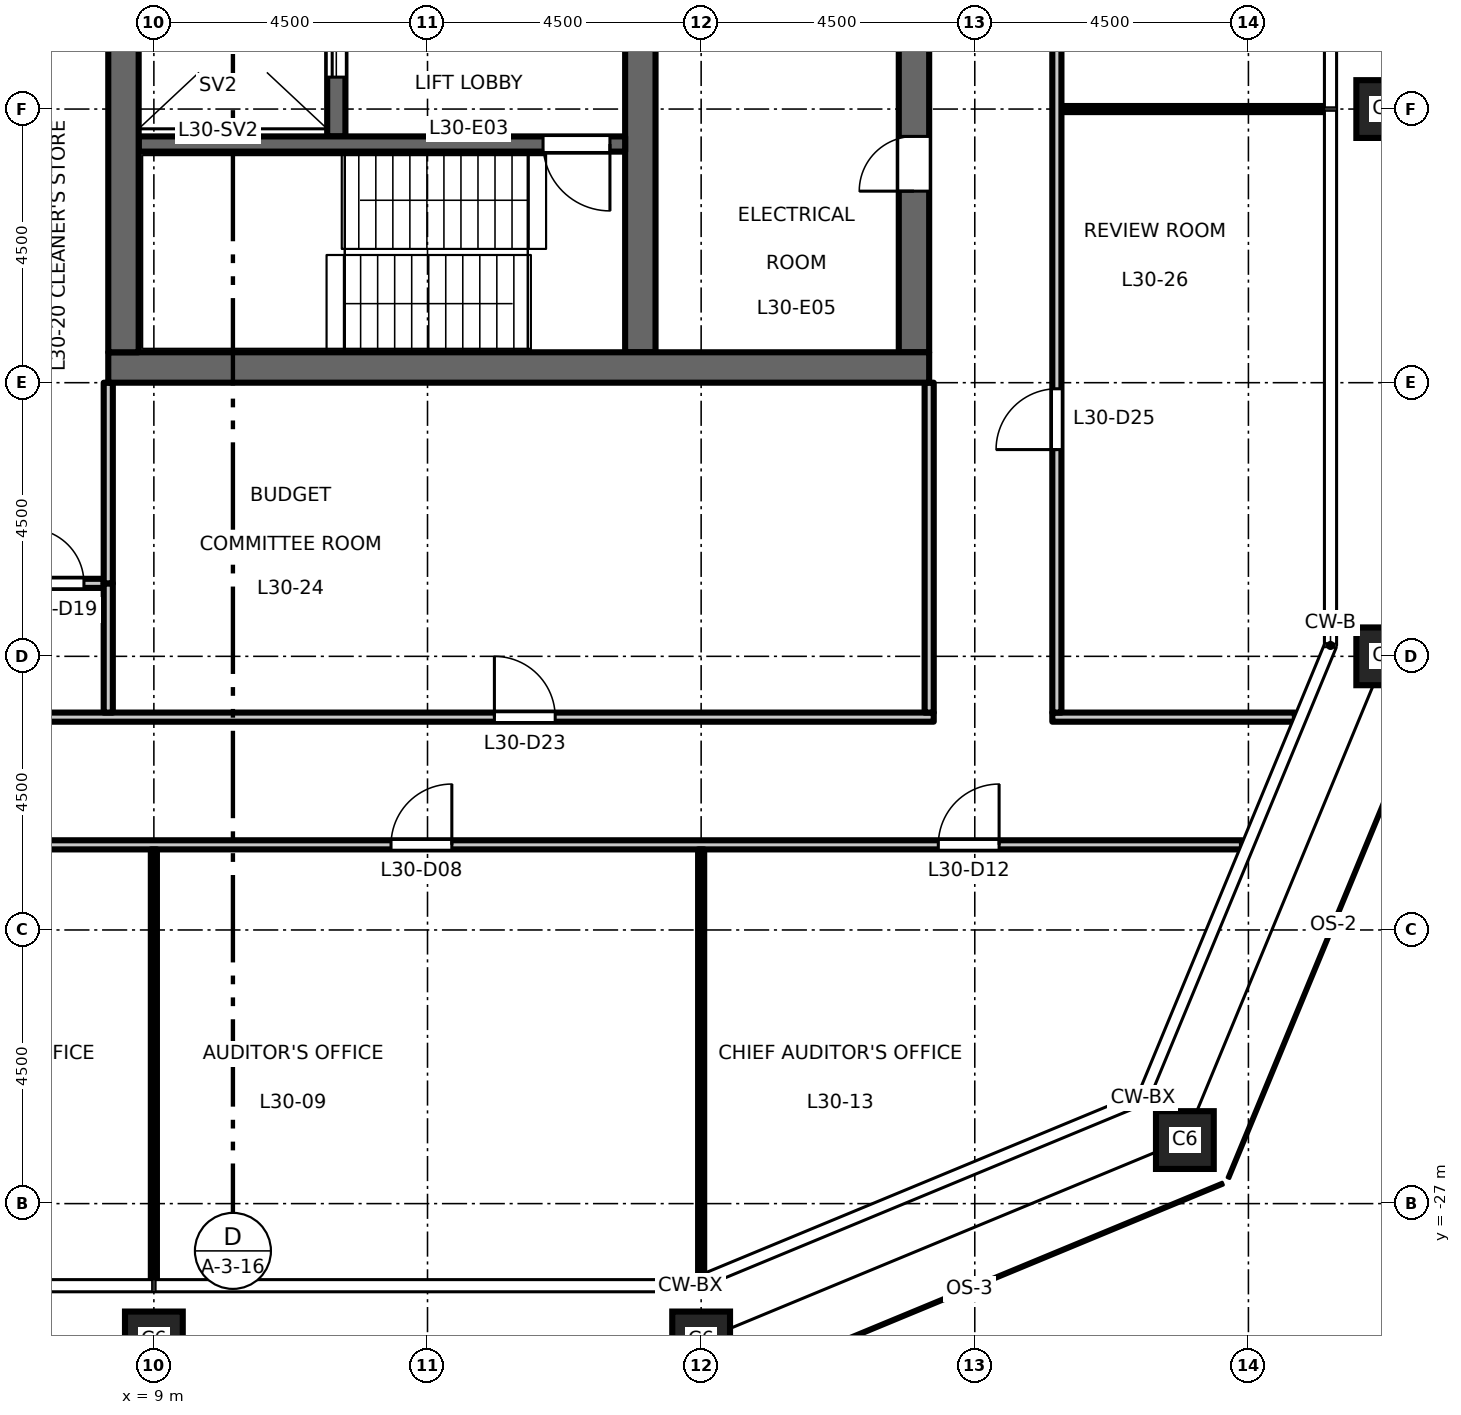
"""IFC4 building model, lengths in metres.
Left out: names, types, materials, properties, quantities, classifications, styles, units other than length and angle.
Written with IfcOpenShell. Run it as: python <this file> out.ifc"""

import sys

from ifc_helpers import new_model, si_unit, direction, frame, frame_2d, origin, origin_2d, place, context, subcontext, project, spatial, rectangle, hollow_rectangle, extrude, element, fill, save


model = new_model("IFC4")
c1 = context("Model", 3, precision=1e-05, world=origin(), true_north=direction((0.0, 1.0)))
c2 = subcontext(c1, "Body", "Model", "MODEL_VIEW")
j1 = project(units=[si_unit("LENGTHUNIT", "METRE"), si_unit("PLANEANGLEUNIT", "RADIAN")], contexts=[c1])
p1 = place(None, origin())
s1 = spatial("IfcSite", under=j1, at=p1, CompositionType="ELEMENT")
p2 = place(p1, origin())
s2 = spatial("IfcBuilding", under=s1, at=p2, CompositionType="ELEMENT")
p3 = place(p2, frame((0.0, 0.0, 140.7)))
s3 = spatial("IfcBuildingStorey", under=s2, at=p3, CompositionType="ELEMENT", Elevation=140.7)
for number, where, z_axis, x_axis in (
    (1, (9.0, -29.25, 0.0), (0.0, 0.0, 1.0), (1.0, 0.0, 0.0)),
    (2, (18.0, -29.25, 0.0), (0.0, 0.0, 1.0), (1.0, 0.0, 0.0)),
    (3, (25.955, -25.955, 0.0), (0.0, 0.0, 1.0), (1.0, 0.0, 0.0)),
    (4, (29.25, -18.0, 0.0), (0.0, 0.0, 1.0), (1.0, 0.0, 0.0)),
    (5, (29.25, -9.0, 0.0), (0.0, 0.0, 1.0), (1.0, 0.0, 0.0)),
):
    element("IfcColumn", number, at=place(p3, frame(where, z_axis=z_axis, x_axis=x_axis)), inside=s3, PredefinedType="COLUMN", context=c2, shape_type="SweptSolid", body=[
        extrude(hollow_rectangle(XDim=0.95, YDim=0.95, WallThickness=0.055, at=origin_2d()), origin(), (0.0, 0.0, 1.0), 4.5),
    ])
p4 = place(p3, frame((12.0, -9.45, 0.0), z_axis=(0.0, 0.0, 1.0), x_axis=(0.0, 1.0, 0.0)))
e6 = element("IfcWall", 6, at=p4, inside=s3, PredefinedType="SHEAR", context=c2, shape_type="SweptSolid", body=[
    extrude(rectangle(XDim=18.9, YDim=0.3, at=frame_2d((9.45, 0.0))), origin(), (0.0, 0.0, 1.0), 4.35),
])
p5 = place(p4, frame((3.625, 0.0, 0.0)))
e7 = element("IfcOpeningElement", 7, at=p5, cuts=e6, PredefinedType="OPENING", context=c2, shape_type="SweptSolid", body=[
    extrude(rectangle(XDim=1.1, YDim=2.1, at=frame_2d((0.55, 1.05))), frame((0.0, 0.16, 0.0), z_axis=(0.0, -1.0, 0.0), x_axis=(1.0, 0.0, 0.0)), (0.0, 0.0, 1.0), 0.32),
])
p6 = place(p4, frame((6.775, 0.0, 0.0)))
e8 = element("IfcOpeningElement", 8, at=p6, cuts=e6, PredefinedType="OPENING", context=c2, shape_type="SweptSolid", body=[
    extrude(rectangle(XDim=1.1, YDim=2.1, at=frame_2d((0.55, 1.05))), frame((0.0, 0.16, 0.0), z_axis=(0.0, -1.0, 0.0), x_axis=(1.0, 0.0, 0.0)), (0.0, 0.0, 1.0), 0.32),
])
p7 = place(p4, frame((9.925, 0.0, 0.0)))
e9 = element("IfcOpeningElement", 9, at=p7, cuts=e6, PredefinedType="OPENING", context=c2, shape_type="SweptSolid", body=[
    extrude(rectangle(XDim=1.1, YDim=2.1, at=frame_2d((0.55, 1.05))), frame((0.0, 0.16, 0.0), z_axis=(0.0, -1.0, 0.0), x_axis=(1.0, 0.0, 0.0)), (0.0, 0.0, 1.0), 0.32),
])
p8 = place(p4, frame((13.075, 0.0, 0.0)))
e10 = element("IfcOpeningElement", 10, at=p8, cuts=e6, PredefinedType="OPENING", context=c2, shape_type="SweptSolid", body=[
    extrude(rectangle(XDim=1.1, YDim=2.1, at=frame_2d((0.55, 1.05))), frame((0.0, 0.16, 0.0), z_axis=(0.0, -1.0, 0.0), x_axis=(1.0, 0.0, 0.0)), (0.0, 0.0, 1.0), 0.32),
])
p9 = place(p4, frame((16.725, 0.0, 0.0)))
e11 = element("IfcOpeningElement", 11, at=p9, cuts=e6, PredefinedType="OPENING", context=c2, shape_type="SweptSolid", body=[
    extrude(rectangle(XDim=1.2, YDim=2.1, at=frame_2d((0.6, 1.05))), frame((0.0, 0.16, 0.0), z_axis=(0.0, -1.0, 0.0), x_axis=(1.0, 0.0, 0.0)), (0.0, 0.0, 1.0), 0.32),
])
p10 = place(p4, frame((0.975, 0.0, 0.0)))
e12 = element("IfcOpeningElement", 12, at=p10, cuts=e6, PredefinedType="OPENING", context=c2, shape_type="SweptSolid", body=[
    extrude(rectangle(XDim=1.2, YDim=2.1, at=frame_2d((0.6, 1.05))), frame((0.0, 0.16, 0.0), z_axis=(0.0, -1.0, 0.0), x_axis=(1.0, 0.0, 0.0)), (0.0, 0.0, 1.0), 0.32),
])
p11 = place(p3, frame((21.5, -13.0, 0.0), z_axis=(0.0, 0.0, 1.0), x_axis=(0.0, 1.0, 0.0)))
e13 = element("IfcWall", 13, at=p11, inside=s3, PredefinedType="SHEAR", context=c2, shape_type="SweptSolid", body=[
    extrude(rectangle(XDim=26.0, YDim=0.5, at=frame_2d((13.0, 0.0))), origin(), (0.0, 0.0, 1.0), 4.35),
])
p12 = place(p11, frame((16.825, 0.0, 0.0)))
e14 = element("IfcOpeningElement", 14, at=p12, cuts=e13, PredefinedType="OPENING", context=c2, shape_type="SweptSolid", body=[
    extrude(rectangle(XDim=1.8, YDim=2.1, at=frame_2d((0.9, 1.05))), frame((0.0, 0.26, 0.0), z_axis=(0.0, -1.0, 0.0), x_axis=(1.0, 0.0, 0.0)), (0.0, 0.0, 1.0), 0.52),
])
p13 = place(p11, frame((7.375, 0.0, 0.0)))
e15 = element("IfcOpeningElement", 15, at=p13, cuts=e13, PredefinedType="OPENING", context=c2, shape_type="SweptSolid", body=[
    extrude(rectangle(XDim=1.8, YDim=2.1, at=frame_2d((0.9, 1.05))), frame((0.0, 0.26, 0.0), z_axis=(0.0, -1.0, 0.0), x_axis=(1.0, 0.0, 0.0)), (0.0, 0.0, 1.0), 0.52),
])
p14 = place(p11, frame((2.65, 0.0, 0.0)))
e16 = element("IfcOpeningElement", 16, at=p14, cuts=e13, PredefinedType="OPENING", context=c2, shape_type="SweptSolid", body=[
    extrude(rectangle(XDim=0.9, YDim=2.1, at=frame_2d((0.45, 1.05))), frame((0.0, 0.26, 0.0), z_axis=(0.0, -1.0, 0.0), x_axis=(1.0, 0.0, 0.0)), (0.0, 0.0, 1.0), 0.52),
])
p15 = place(p3, frame((17.0, -13.0, 0.0), z_axis=(0.0, 0.0, 1.0), x_axis=(0.0, 1.0, 0.0)))
e17 = element("IfcWall", 17, at=p15, inside=s3, PredefinedType="SHEAR", context=c2, shape_type="SweptSolid", body=[
    extrude(rectangle(XDim=6.575, YDim=0.5, at=frame_2d((3.288, 0.0))), origin(), (0.0, 0.0, 1.0), 4.35),
])
p16 = place(p3, frame((8.75, -9.575, 0.0), z_axis=(0.0, 0.0, 1.0), x_axis=(1.0, 0.0, 0.0)))
e18 = element("IfcWall", 18, at=p16, inside=s3, PredefinedType="SHEAR", context=c2, shape_type="SweptSolid", body=[
    extrude(rectangle(XDim=8.0, YDim=0.25, at=frame_2d((4.0, 0.0))), origin(), (0.0, 0.0, 1.0), 4.35),
])
p17 = place(p16, frame((6.65, 0.0, 0.0)))
e19 = element("IfcOpeningElement", 19, at=p17, cuts=e18, PredefinedType="OPENING", context=c2, shape_type="SweptSolid", body=[
    extrude(rectangle(XDim=1.1, YDim=2.1, at=frame_2d((0.55, 1.05))), frame((0.0, 0.135, 0.0), z_axis=(0.0, -1.0, 0.0), x_axis=(1.0, 0.0, 0.0)), (0.0, 0.0, 1.0), 0.27),
])
p18 = place(p3, frame((8.25, -13.25, 0.0), z_axis=(0.0, 0.0, 1.0), x_axis=(1.0, 0.0, 0.0)))
e20 = element("IfcWall", 20, at=p18, inside=s3, PredefinedType="SHEAR", context=c2, shape_type="SweptSolid", body=[
    extrude(rectangle(XDim=13.5, YDim=0.5, at=frame_2d((6.75, 0.0))), origin(), (0.0, 0.0, 1.0), 4.35),
])
p19 = place(p3, frame((8.5, -13.0, 0.0), z_axis=(0.0, 0.0, 1.0), x_axis=(0.0, 1.0, 0.0)))
e21 = element("IfcWall", 21, at=p19, inside=s3, PredefinedType="SHEAR", context=c2, shape_type="SweptSolid", body=[
    extrude(rectangle(XDim=26.0, YDim=0.5, at=frame_2d((13.0, 0.0))), origin(), (0.0, 0.0, 1.0), 4.35),
])
p20 = place(p3, frame((-26.894, -21.1, 0.0), z_axis=(0.0, 0.0, 1.0), x_axis=(1.0, 0.0, 0.0)))
e22 = element("IfcWall", 22, at=p20, inside=s3, PredefinedType="PARTITIONING", context=c2, shape_type="SweptSolid", body=[
    extrude(rectangle(XDim=53.788, YDim=0.15, at=frame_2d((26.894, 0.0))), origin(), (0.0, 0.0, 1.0), 4.35),
])
p21 = place(p20, frame((12.794, 0.0, 0.0)))
e23 = element("IfcOpeningElement", 23, at=p21, cuts=e22, PredefinedType="OPENING", context=c2, shape_type="SweptSolid", body=[
    extrude(rectangle(XDim=1.0, YDim=2.1, at=frame_2d((0.5, 1.05))), frame((0.0, 0.085, 0.0), z_axis=(0.0, -1.0, 0.0), x_axis=(1.0, 0.0, 0.0)), (0.0, 0.0, 1.0), 0.17),
])
p22 = place(p20, frame((21.794, 0.0, 0.0)))
e24 = element("IfcOpeningElement", 24, at=p22, cuts=e22, PredefinedType="OPENING", context=c2, shape_type="SweptSolid", body=[
    extrude(rectangle(XDim=1.0, YDim=2.1, at=frame_2d((0.5, 1.05))), frame((0.0, 0.085, 0.0), z_axis=(0.0, -1.0, 0.0), x_axis=(1.0, 0.0, 0.0)), (0.0, 0.0, 1.0), 0.17),
])
p23 = place(p20, frame((30.794, 0.0, 0.0)))
e25 = element("IfcOpeningElement", 25, at=p23, cuts=e22, PredefinedType="OPENING", context=c2, shape_type="SweptSolid", body=[
    extrude(rectangle(XDim=1.0, YDim=2.1, at=frame_2d((0.5, 1.05))), frame((0.0, 0.085, 0.0), z_axis=(0.0, -1.0, 0.0), x_axis=(1.0, 0.0, 0.0)), (0.0, 0.0, 1.0), 0.17),
])
p24 = place(p20, frame((39.794, 0.0, 0.0)))
e26 = element("IfcOpeningElement", 26, at=p24, cuts=e22, PredefinedType="OPENING", context=c2, shape_type="SweptSolid", body=[
    extrude(rectangle(XDim=1.0, YDim=2.1, at=frame_2d((0.5, 1.05))), frame((0.0, 0.085, 0.0), z_axis=(0.0, -1.0, 0.0), x_axis=(1.0, 0.0, 0.0)), (0.0, 0.0, 1.0), 0.17),
])
p25 = place(p20, frame((3.9, 0.0, 0.0)))
e27 = element("IfcOpeningElement", 27, at=p25, cuts=e22, PredefinedType="OPENING", context=c2, shape_type="SweptSolid", body=[
    extrude(rectangle(XDim=1.0, YDim=2.1, at=frame_2d((0.5, 1.05))), frame((0.0, 0.085, 0.0), z_axis=(0.0, -1.0, 0.0), x_axis=(1.0, 0.0, 0.0)), (0.0, 0.0, 1.0), 0.17),
])
p26 = place(p20, frame((48.794, 0.0, 0.0)))
e28 = element("IfcOpeningElement", 28, at=p26, cuts=e22, PredefinedType="OPENING", context=c2, shape_type="SweptSolid", body=[
    extrude(rectangle(XDim=1.0, YDim=2.1, at=frame_2d((0.5, 1.05))), frame((0.0, 0.085, 0.0), z_axis=(0.0, -1.0, 0.0), x_axis=(1.0, 0.0, 0.0)), (0.0, 0.0, 1.0), 0.17),
])
p27 = place(p3, frame((-21.825, -19.0, 0.0), z_axis=(0.0, 0.0, 1.0), x_axis=(1.0, 0.0, 0.0)))
e29 = element("IfcWall", 29, at=p27, inside=s3, PredefinedType="PARTITIONING", context=c2, shape_type="SweptSolid", body=[
    extrude(rectangle(XDim=43.65, YDim=0.15, at=frame_2d((21.825, 0.0))), origin(), (0.0, 0.0, 1.0), 4.35),
])
p28 = place(p27, frame((21.425, 0.0, 0.0)))
e30 = element("IfcOpeningElement", 30, at=p28, cuts=e29, PredefinedType="OPENING", context=c2, shape_type="SweptSolid", body=[
    extrude(rectangle(XDim=1.0, YDim=2.1, at=frame_2d((0.5, 1.05))), frame((0.0, 0.085, 0.0), z_axis=(0.0, -1.0, 0.0), x_axis=(1.0, 0.0, 0.0)), (0.0, 0.0, 1.0), 0.17),
])
p29 = place(p27, frame((6.425, 0.0, 0.0)))
e31 = element("IfcOpeningElement", 31, at=p29, cuts=e29, PredefinedType="OPENING", context=c2, shape_type="SweptSolid", body=[
    extrude(rectangle(XDim=1.0, YDim=2.1, at=frame_2d((0.5, 1.05))), frame((0.0, 0.085, 0.0), z_axis=(0.0, -1.0, 0.0), x_axis=(1.0, 0.0, 0.0)), (0.0, 0.0, 1.0), 0.17),
])
p30 = place(p27, frame((36.425, 0.0, 0.0)))
e32 = element("IfcOpeningElement", 32, at=p30, cuts=e29, PredefinedType="OPENING", context=c2, shape_type="SweptSolid", body=[
    extrude(rectangle(XDim=1.0, YDim=2.1, at=frame_2d((0.5, 1.05))), frame((0.0, 0.085, 0.0), z_axis=(0.0, -1.0, 0.0), x_axis=(1.0, 0.0, 0.0)), (0.0, 0.0, 1.0), 0.17),
])
p31 = place(p3, frame((23.775, -19.0, 0.0), z_axis=(0.0, 0.0, 1.0), x_axis=(1.0, 0.0, 0.0)))
e33 = element("IfcWall", 33, at=p31, inside=s3, PredefinedType="PARTITIONING", context=c2, shape_type="SweptSolid", body=[
    extrude(rectangle(XDim=3.989, YDim=0.15, at=frame_2d((1.995, 0.0))), origin(), (0.0, 0.0, 1.0), 4.35),
])
p32 = place(p3, frame((6.66, -16.8, 0.0), z_axis=(0.0, 0.0, 1.0), x_axis=(1.0, 0.0, 0.0)))
e34 = element("IfcWall", 34, at=p32, inside=s3, PredefinedType="PARTITIONING", context=c2, shape_type="SweptSolid", body=[
    extrude(rectangle(XDim=1.515, YDim=0.15, at=frame_2d((0.758, 0.0))), origin(), (0.0, 0.0, 1.0), 4.35),
])
p33 = place(p32, frame((0.29, 0.0, 0.0)))
e35 = element("IfcOpeningElement", 35, at=p33, cuts=e34, PredefinedType="OPENING", context=c2, shape_type="SweptSolid", body=[
    extrude(rectangle(XDim=0.9, YDim=2.1, at=frame_2d((0.45, 1.05))), frame((0.0, 0.085, 0.0), z_axis=(0.0, -1.0, 0.0), x_axis=(1.0, 0.0, 0.0)), (0.0, 0.0, 1.0), 0.17),
])
p34 = place(p3, frame((23.925, -9.0, 0.0), z_axis=(0.0, 0.0, 1.0), x_axis=(1.0, 0.0, 0.0)))
e36 = element("IfcWall", 36, at=p34, inside=s3, PredefinedType="PARTITIONING", context=c2, shape_type="SweptSolid", body=[
    extrude(rectangle(XDim=4.335, YDim=0.1, at=frame_2d((2.167, 0.0))), origin(), (0.0, 0.0, 1.0), 4.35),
])
p35 = place(p3, frame((8.25, -18.925, 0.0), z_axis=(0.0, 0.0, 1.0), x_axis=(0.0, 1.0, 0.0)))
e37 = element("IfcWall", 37, at=p35, inside=s3, PredefinedType="PARTITIONING", context=c2, shape_type="SweptSolid", body=[
    extrude(rectangle(XDim=2.125, YDim=0.15, at=frame_2d((1.062, 0.0))), origin(), (0.0, 0.0, 1.0), 4.35),
])
p36 = place(p3, frame((8.25, -16.8, 0.0), z_axis=(0.0, 0.0, 1.0), x_axis=(0.0, 1.0, 0.0)))
e38 = element("IfcWall", 38, at=p36, inside=s3, PredefinedType="PARTITIONING", context=c2, shape_type="SweptSolid", body=[
    extrude(rectangle(XDim=3.3, YDim=0.15, at=frame_2d((1.65, 0.0))), origin(), (0.0, 0.0, 1.0), 4.35),
])
p37 = place(p3, frame((9.0, -28.26, 0.0), z_axis=(0.0, 0.0, 1.0), x_axis=(0.0, 1.0, 0.0)))
e39 = element("IfcWall", 39, at=p37, inside=s3, PredefinedType="PARTITIONING", context=c2, shape_type="SweptSolid", body=[
    extrude(rectangle(XDim=7.085, YDim=0.1, at=frame_2d((3.542, 0.0))), origin(), (0.0, 0.0, 1.0), 3.45),
])
p38 = place(p3, frame((18.0, -28.178, 0.0), z_axis=(0.0, 0.0, 1.0), x_axis=(0.0, 1.0, 0.0)))
e40 = element("IfcWall", 40, at=p38, inside=s3, PredefinedType="PARTITIONING", context=c2, shape_type="SweptSolid", body=[
    extrude(rectangle(XDim=7.003, YDim=0.1, at=frame_2d((3.501, 0.0))), origin(), (0.0, 0.0, 1.0), 3.45),
])
p39 = place(p3, frame((21.75, -18.925, 0.0), z_axis=(0.0, 0.0, 1.0), x_axis=(0.0, 1.0, 0.0)))
e41 = element("IfcWall", 41, at=p39, inside=s3, PredefinedType="PARTITIONING", context=c2, shape_type="SweptSolid", body=[
    extrude(rectangle(XDim=5.425, YDim=0.15, at=frame_2d((2.712, 0.0))), origin(), (0.0, 0.0, 1.0), 4.35),
])
p40 = place(p3, frame((23.85, -18.925, 0.0), z_axis=(0.0, 0.0, 1.0), x_axis=(0.0, 1.0, 0.0)))
e42 = element("IfcWall", 42, at=p40, inside=s3, PredefinedType="PARTITIONING", context=c2, shape_type="SweptSolid", body=[
    extrude(rectangle(XDim=37.85, YDim=0.15, at=frame_2d((18.925, 0.0))), origin(), (0.0, 0.0, 1.0), 4.35),
])
p41 = place(p40, frame((4.325, 0.0, 0.0)))
e43 = element("IfcOpeningElement", 43, at=p41, cuts=e42, PredefinedType="OPENING", context=c2, shape_type="SweptSolid", body=[
    extrude(rectangle(XDim=1.0, YDim=2.1, at=frame_2d((0.5, 1.05))), frame((0.0, 0.085, 0.0), z_axis=(0.0, -1.0, 0.0), x_axis=(1.0, 0.0, 0.0)), (0.0, 0.0, 1.0), 0.17),
])
p42 = place(p40, frame((13.825, 0.0, 0.0)))
e44 = element("IfcOpeningElement", 44, at=p42, cuts=e42, PredefinedType="OPENING", context=c2, shape_type="SweptSolid", body=[
    extrude(rectangle(XDim=1.0, YDim=2.1, at=frame_2d((0.5, 1.05))), frame((0.0, 0.085, 0.0), z_axis=(0.0, -1.0, 0.0), x_axis=(1.0, 0.0, 0.0)), (0.0, 0.0, 1.0), 0.17),
])
p43 = place(p40, frame((22.825, 0.0, 0.0)))
e45 = element("IfcOpeningElement", 45, at=p43, cuts=e42, PredefinedType="OPENING", context=c2, shape_type="SweptSolid", body=[
    extrude(rectangle(XDim=1.0, YDim=2.1, at=frame_2d((0.5, 1.05))), frame((0.0, 0.085, 0.0), z_axis=(0.0, -1.0, 0.0), x_axis=(1.0, 0.0, 0.0)), (0.0, 0.0, 1.0), 0.17),
])
p44 = place(p40, frame((32.325, 0.0, 0.0)))
e46 = element("IfcOpeningElement", 46, at=p44, cuts=e42, PredefinedType="OPENING", context=c2, shape_type="SweptSolid", body=[
    extrude(rectangle(XDim=1.0, YDim=2.1, at=frame_2d((0.5, 1.05))), frame((0.0, 0.085, 0.0), z_axis=(0.0, -1.0, 0.0), x_axis=(1.0, 0.0, 0.0)), (0.0, 0.0, 1.0), 0.17),
])
p45 = place(p17, origin())
e47 = element("IfcDoor", 47, at=p45, inside=s3, OperationType="SINGLE_SWING_RIGHT", PredefinedType="DOOR", context=c2, shape_type="SweptSolid", body=[
    extrude(rectangle(XDim=1.1, YDim=2.1, at=frame_2d((0.55, 1.05))), frame((0.0, 0.025, 0.0), z_axis=(0.0, -1.0, 0.0), x_axis=(1.0, 0.0, 0.0)), (0.0, 0.0, 1.0), 0.05),
])
fill(e19, e47)
p46 = place(p10, origin())
e48 = element("IfcDoor", 48, at=p46, inside=s3, OperationType="DOUBLE_DOOR_SLIDING", PredefinedType="DOOR", context=c2, shape_type="SweptSolid", body=[
    extrude(rectangle(XDim=1.2, YDim=2.1, at=frame_2d((0.6, 1.05))), frame((0.0, 0.025, 0.0), z_axis=(0.0, -1.0, 0.0), x_axis=(1.0, 0.0, 0.0)), (0.0, 0.0, 1.0), 0.05),
])
fill(e12, e48)
p47 = place(p14, origin())
e49 = element("IfcDoor", 49, at=p47, inside=s3, OperationType="SINGLE_SWING_RIGHT", PredefinedType="DOOR", context=c2, shape_type="SweptSolid", body=[
    extrude(rectangle(XDim=0.9, YDim=2.1, at=frame_2d((0.45, 1.05))), frame((0.0, 0.025, 0.0), z_axis=(0.0, -1.0, 0.0), x_axis=(1.0, 0.0, 0.0)), (0.0, 0.0, 1.0), 0.05),
])
fill(e16, e49)
p48 = place(p24, origin())
e50 = element("IfcDoor", 50, at=p48, inside=s3, OperationType="SINGLE_SWING_RIGHT", PredefinedType="DOOR", context=c2, shape_type="SweptSolid", body=[
    extrude(rectangle(XDim=1.0, YDim=2.1, at=frame_2d((0.5, 1.05))), frame((0.0, 0.025, 0.0), z_axis=(0.0, -1.0, 0.0), x_axis=(1.0, 0.0, 0.0)), (0.0, 0.0, 1.0), 0.05),
])
fill(e26, e50)
p49 = place(p26, origin())
e51 = element("IfcDoor", 51, at=p49, inside=s3, OperationType="SINGLE_SWING_RIGHT", PredefinedType="DOOR", context=c2, shape_type="SweptSolid", body=[
    extrude(rectangle(XDim=1.0, YDim=2.1, at=frame_2d((0.5, 1.05))), frame((0.0, 0.025, 0.0), z_axis=(0.0, -1.0, 0.0), x_axis=(1.0, 0.0, 0.0)), (0.0, 0.0, 1.0), 0.05),
])
fill(e28, e51)
p50 = place(p33, origin())
e52 = element("IfcDoor", 52, at=p50, inside=s3, OperationType="SINGLE_SWING_LEFT", PredefinedType="DOOR", context=c2, shape_type="SweptSolid", body=[
    extrude(rectangle(XDim=0.9, YDim=2.1, at=frame_2d((0.45, 1.05))), frame((0.0, 0.025, 0.0), z_axis=(0.0, -1.0, 0.0), x_axis=(1.0, 0.0, 0.0)), (0.0, 0.0, 1.0), 0.05),
])
fill(e35, e52)
p51 = place(p30, origin())
e53 = element("IfcDoor", 53, at=p51, inside=s3, OperationType="SINGLE_SWING_LEFT", PredefinedType="DOOR", context=c2, shape_type="SweptSolid", body=[
    extrude(rectangle(XDim=1.0, YDim=2.1, at=frame_2d((0.5, 1.05))), frame((0.0, 0.025, 0.0), z_axis=(0.0, -1.0, 0.0), x_axis=(1.0, 0.0, 0.0)), (0.0, 0.0, 1.0), 0.05),
])
fill(e32, e53)
p52 = place(p41, origin())
e54 = element("IfcDoor", 54, at=p52, inside=s3, OperationType="SINGLE_SWING_LEFT", PredefinedType="DOOR", context=c2, shape_type="SweptSolid", body=[
    extrude(rectangle(XDim=1.0, YDim=2.1, at=frame_2d((0.5, 1.05))), frame((0.0, 0.025, 0.0), z_axis=(0.0, -1.0, 0.0), x_axis=(1.0, 0.0, 0.0)), (0.0, 0.0, 1.0), 0.05),
])
fill(e43, e54)
save(model, sys.argv[1])
